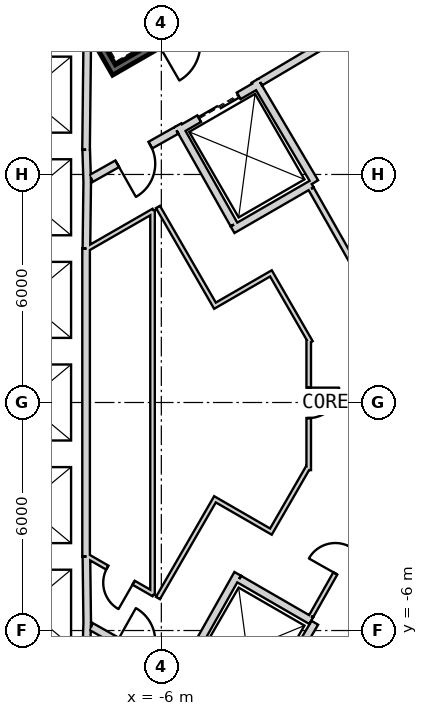
"""IFC4 building model, lengths in metres.
Left out: names, types, materials, properties, quantities, classifications, styles, units other than length and angle.
Written with IfcOpenShell. Run it as: python <this file> out.ifc"""

import sys

from ifc_helpers import new_model, si_unit, direction, frame, frame_2d, origin, place, context, subcontext, project, spatial, rectangle, extrude, element, fill, save


model = new_model("IFC4")
c1 = context("Model", 3, precision=1e-05, world=origin(), true_north=direction((0.0, 1.0)))
c2 = subcontext(c1, "Body", "Model", "MODEL_VIEW")
j1 = project(units=[si_unit("LENGTHUNIT", "METRE"), si_unit("PLANEANGLEUNIT", "RADIAN")], contexts=[c1])
p1 = place(None, origin())
s1 = spatial("IfcSite", under=j1, at=p1, CompositionType="ELEMENT")
p2 = place(p1, origin())
s2 = spatial("IfcBuilding", under=s1, at=p2, CompositionType="ELEMENT")
p3 = place(p2, frame((0.0, 0.0, 181.2)))
s3 = spatial("IfcBuildingStorey", under=s2, at=p3, CompositionType="ELEMENT", Elevation=181.2)
p4 = place(p3, frame((19.475, 2.208, 0.0), z_axis=(0.0, 0.0, 1.0), x_axis=(-0.866028369851, 0.499994862586, 0.0)))
e1 = element("IfcWall", 1, at=p4, inside=s3, PredefinedType="SHEAR", context=c2, shape_type="SweptSolid", body=[
    extrude(rectangle(XDim=31.523, YDim=0.9, at=frame_2d((15.762, 0.0))), origin(), (0.0, 0.0, 1.0), 4.0),
])
p5 = place(p4, frame((7.062, 0.0, 0.0)))
e2 = element("IfcOpeningElement", 2, at=p5, cuts=e1, PredefinedType="OPENING", context=c2, shape_type="SweptSolid", body=[
    extrude(rectangle(XDim=1.2, YDim=2.4, at=frame_2d((0.6, 1.2))), frame((0.0, 0.46, 0.0), z_axis=(0.0, -1.0, 0.0), x_axis=(1.0, 0.0, 0.0)), (0.0, 0.0, 1.0), 0.92),
])
p6 = place(p4, frame((3.612, 0.0, 0.0)))
e3 = element("IfcOpeningElement", 3, at=p6, cuts=e1, PredefinedType="OPENING", context=c2, shape_type="SweptSolid", body=[
    extrude(rectangle(XDim=1.2, YDim=2.4, at=frame_2d((0.6, 1.2))), frame((0.0, 0.46, 0.0), z_axis=(0.0, -1.0, 0.0), x_axis=(1.0, 0.0, 0.0)), (0.0, 0.0, 1.0), 0.92),
])
p7 = place(p4, frame((26.712, 0.0, 0.0)))
e4 = element("IfcOpeningElement", 4, at=p7, cuts=e1, PredefinedType="OPENING", context=c2, shape_type="SweptSolid", body=[
    extrude(rectangle(XDim=1.2, YDim=2.4, at=frame_2d((0.6, 1.2))), frame((0.0, 0.46, 0.0), z_axis=(0.0, -1.0, 0.0), x_axis=(1.0, 0.0, 0.0)), (0.0, 0.0, 1.0), 0.92),
])
p8 = place(p3, frame((-7.825, -17.97, 0.0), z_axis=(0.0, 0.0, 1.0), x_axis=(0.866028369851, 0.499994862586, 0.0)))
e5 = element("IfcWall", 5, at=p8, inside=s3, PredefinedType="SHEAR", context=c2, shape_type="SweptSolid", body=[
    extrude(rectangle(XDim=31.523, YDim=0.9, at=frame_2d((15.762, 0.0))), origin(), (0.0, 0.0, 1.0), 4.0),
])
p9 = place(p8, frame((7.062, 0.0, 0.0)))
e6 = element("IfcOpeningElement", 6, at=p9, cuts=e5, PredefinedType="OPENING", context=c2, shape_type="SweptSolid", body=[
    extrude(rectangle(XDim=1.2, YDim=2.4, at=frame_2d((0.6, 1.2))), frame((0.0, 0.46, 0.0), z_axis=(0.0, -1.0, 0.0), x_axis=(1.0, 0.0, 0.0)), (0.0, 0.0, 1.0), 0.92),
])
p10 = place(p8, frame((9.762, 0.0, 0.0)))
e7 = element("IfcOpeningElement", 7, at=p10, cuts=e5, PredefinedType="OPENING", context=c2, shape_type="SweptSolid", body=[
    extrude(rectangle(XDim=1.2, YDim=2.4, at=frame_2d((0.6, 1.2))), frame((0.0, 0.46, 0.0), z_axis=(0.0, -1.0, 0.0), x_axis=(1.0, 0.0, 0.0)), (0.0, 0.0, 1.0), 0.92),
])
p11 = place(p8, frame((12.462, 0.0, 0.0)))
e8 = element("IfcOpeningElement", 8, at=p11, cuts=e5, PredefinedType="OPENING", context=c2, shape_type="SweptSolid", body=[
    extrude(rectangle(XDim=1.2, YDim=2.4, at=frame_2d((0.6, 1.2))), frame((0.0, 0.46, 0.0), z_axis=(0.0, -1.0, 0.0), x_axis=(1.0, 0.0, 0.0)), (0.0, 0.0, 1.0), 0.92),
])
p12 = place(p8, frame((15.162, 0.0, 0.0)))
e9 = element("IfcOpeningElement", 9, at=p12, cuts=e5, PredefinedType="OPENING", context=c2, shape_type="SweptSolid", body=[
    extrude(rectangle(XDim=1.2, YDim=2.4, at=frame_2d((0.6, 1.2))), frame((0.0, 0.46, 0.0), z_axis=(0.0, -1.0, 0.0), x_axis=(1.0, 0.0, 0.0)), (0.0, 0.0, 1.0), 0.92),
])
p13 = place(p8, frame((17.862, 0.0, 0.0)))
e10 = element("IfcOpeningElement", 10, at=p13, cuts=e5, PredefinedType="OPENING", context=c2, shape_type="SweptSolid", body=[
    extrude(rectangle(XDim=1.2, YDim=2.4, at=frame_2d((0.6, 1.2))), frame((0.0, 0.46, 0.0), z_axis=(0.0, -1.0, 0.0), x_axis=(1.0, 0.0, 0.0)), (0.0, 0.0, 1.0), 0.92),
])
p14 = place(p8, frame((20.562, 0.0, 0.0)))
e11 = element("IfcOpeningElement", 11, at=p14, cuts=e5, PredefinedType="OPENING", context=c2, shape_type="SweptSolid", body=[
    extrude(rectangle(XDim=1.2, YDim=2.4, at=frame_2d((0.6, 1.2))), frame((0.0, 0.46, 0.0), z_axis=(0.0, -1.0, 0.0), x_axis=(1.0, 0.0, 0.0)), (0.0, 0.0, 1.0), 0.92),
])
p15 = place(p8, frame((26.712, 0.0, 0.0)))
e12 = element("IfcOpeningElement", 12, at=p15, cuts=e5, PredefinedType="OPENING", context=c2, shape_type="SweptSolid", body=[
    extrude(rectangle(XDim=1.2, YDim=2.4, at=frame_2d((0.6, 1.2))), frame((0.0, 0.46, 0.0), z_axis=(0.0, -1.0, 0.0), x_axis=(1.0, 0.0, 0.0)), (0.0, 0.0, 1.0), 0.92),
])
p16 = place(p8, frame((3.612, 0.0, 0.0)))
e13 = element("IfcOpeningElement", 13, at=p16, cuts=e5, PredefinedType="OPENING", context=c2, shape_type="SweptSolid", body=[
    extrude(rectangle(XDim=1.2, YDim=2.4, at=frame_2d((0.6, 1.2))), frame((0.0, 0.46, 0.0), z_axis=(0.0, -1.0, 0.0), x_axis=(1.0, 0.0, 0.0)), (0.0, 0.0, 1.0), 0.92),
])
p17 = place(p3, frame((-7.951, 9.35, 0.0), z_axis=(0.0, 0.0, 1.0), x_axis=(-0.011120469654, -0.999938165666, 0.0)))
e14 = element("IfcWall", 14, at=p17, inside=s3, PredefinedType="PLUMBINGWALL", context=c2, shape_type="SweptSolid", body=[
    extrude(rectangle(XDim=2.7, YDim=0.2, at=frame_2d((1.35, 0.0))), origin(), (0.0, 0.0, 1.0), 3.7),
])
p18 = place(p3, frame((-7.977, 6.65, 0.0), z_axis=(0.0, 0.0, 1.0), x_axis=(0.030861509705, -0.999523670164, 0.0)))
e15 = element("IfcWall", 15, at=p18, inside=s3, PredefinedType="PLUMBINGWALL", context=c2, shape_type="SweptSolid", body=[
    extrude(rectangle(XDim=0.878, YDim=0.2, at=frame_2d((0.439, 0.0))), origin(), (0.0, 0.0, 1.0), 3.7),
])
p19 = place(p3, frame((-7.949, 5.895, 0.0), z_axis=(0.0, 0.0, 1.0), x_axis=(-0.012042535896, -0.999927486035, 0.0)))
e16 = element("IfcWall", 16, at=p19, inside=s3, PredefinedType="PLUMBINGWALL", context=c2, shape_type="SweptSolid", body=[
    extrude(rectangle(XDim=1.845, YDim=0.2, at=frame_2d((0.922, 0.0))), origin(), (0.0, 0.0, 1.0), 3.7),
])
p20 = place(p3, frame((-7.98, 4.05, 0.0), z_axis=(0.0, 0.0, 1.0), x_axis=(0.0, -1.0, 0.0)))
e17 = element("IfcWall", 17, at=p20, inside=s3, PredefinedType="PLUMBINGWALL", context=c2, shape_type="SweptSolid", body=[
    extrude(rectangle(XDim=8.1, YDim=0.2, at=frame_2d((4.05, 0.0))), origin(), (0.0, 0.0, 1.0), 3.7),
])
p21 = place(p3, frame((-7.95, -5.772, 0.0), z_axis=(0.0, 0.0, 1.0), x_axis=(-0.030803413295, -0.999525462272, 0.0)))
e18 = element("IfcWall", 18, at=p21, inside=s3, PredefinedType="PLUMBINGWALL", context=c2, shape_type="SweptSolid", body=[
    extrude(rectangle(XDim=1.078, YDim=0.2, at=frame_2d((0.539, 0.0))), origin(), (0.0, 0.0, 1.0), 3.7),
])
p22 = place(p3, frame((-7.971, -4.05, 0.0), z_axis=(0.0, 0.0, 1.0), x_axis=(0.012042535896, -0.999927486035, 0.0)))
e19 = element("IfcWall", 19, at=p22, inside=s3, PredefinedType="PLUMBINGWALL", context=c2, shape_type="SweptSolid", body=[
    extrude(rectangle(XDim=1.845, YDim=0.2, at=frame_2d((0.922, 0.0))), origin(), (0.0, 0.0, 1.0), 3.7),
])
p23 = place(p3, frame((-11.245, 15.678, -0.3), z_axis=(0.0, 0.0, 1.0), x_axis=(0.499977274689, -0.866038523851, 0.0)))
e20 = element("IfcWall", 20, at=p23, inside=s3, PredefinedType="SHEAR", context=c2, shape_type="SweptSolid", body=[
    extrude(rectangle(XDim=8.1, YDim=0.2, at=frame_2d((4.05, 0.0))), origin(), (0.0, 0.0, 1.0), 4.0),
])
p24 = place(p3, frame((-7.159, 8.8, -0.3), z_axis=(0.0, 0.0, 1.0), x_axis=(0.866047807691, 0.499961193289, 0.0)))
e21 = element("IfcWall", 21, at=p24, inside=s3, PredefinedType="SHEAR", context=c2, shape_type="SweptSolid", body=[
    extrude(rectangle(XDim=3.6, YDim=0.2, at=frame_2d((1.8, 0.0))), origin(), (0.0, 0.0, 1.0), 4.0),
])
p25 = place(p24, frame((1.25, 0.0, 0.3)))
e22 = element("IfcOpeningElement", 22, at=p25, cuts=e21, PredefinedType="OPENING", context=c2, shape_type="SweptSolid", body=[
    extrude(rectangle(XDim=1.1, YDim=2.1, at=frame_2d((0.55, 1.05))), frame((0.0, 0.11, 0.0), z_axis=(0.0, -1.0, 0.0), x_axis=(1.0, 0.0, 0.0)), (0.0, 0.0, 1.0), 0.22),
])
p26 = place(p3, frame((-5.524, 7.168, 0.0), z_axis=(0.0, 0.0, 1.0), x_axis=(0.866024647952, 0.500001309137, 0.0)))
e23 = element("IfcWall", 23, at=p26, inside=s3, PredefinedType="PLUMBINGWALL", context=c2, shape_type="SweptSolid", body=[
    extrude(rectangle(XDim=2.4, YDim=0.2, at=frame_2d((1.2, 0.0))), origin(), (0.0, 0.0, 1.0), 3.7),
])
p27 = place(p26, frame((0.6, 0.0, 0.0)))
e24 = element("IfcOpeningElement", 24, at=p27, cuts=e23, PredefinedType="OPENING", context=c2, shape_type="SweptSolid", body=[
    extrude(rectangle(XDim=1.2, YDim=2.4, at=frame_2d((0.6, 1.2))), frame((0.0, 0.11, 0.0), z_axis=(0.0, -1.0, 0.0), x_axis=(1.0, 0.0, 0.0)), (0.0, 0.0, 1.0), 0.22),
])
p28 = place(p3, frame((-3.538, 8.465, 0.0), z_axis=(0.0, 0.0, 1.0), x_axis=(0.508647062354, -0.860975125052, 0.0)))
e25 = element("IfcWall", 25, at=p28, inside=s3, PredefinedType="PLUMBINGWALL", context=c2, shape_type="SweptSolid", body=[
    extrude(rectangle(XDim=3.1, YDim=0.2, at=frame_2d((1.55, 0.0))), origin(), (0.0, 0.0, 1.0), 3.7),
])
p29 = place(p3, frame((-2.043, 5.748, 0.0), z_axis=(0.0, 0.0, 1.0), x_axis=(-0.866035096217, -0.499983211839, 0.0)))
e26 = element("IfcWall", 26, at=p29, inside=s3, PredefinedType="PLUMBINGWALL", context=c2, shape_type="SweptSolid", body=[
    extrude(rectangle(XDim=2.404, YDim=0.2, at=frame_2d((1.202, 0.0))), origin(), (0.0, 0.0, 1.0), 3.7),
])
p30 = place(p3, frame((-5.562, 7.296, 0.0), z_axis=(0.0, 0.0, 1.0), x_axis=(0.49134651263, -0.870964180966, 0.0)))
e27 = element("IfcWall", 27, at=p30, inside=s3, PredefinedType="PLUMBINGWALL", context=c2, shape_type="SweptSolid", body=[
    extrude(rectangle(XDim=3.0, YDim=0.2, at=frame_2d((1.5, 0.0))), origin(), (0.0, 0.0, 1.0), 3.7),
])
p31 = place(p3, frame((-1.961, -5.796, 0.0), z_axis=(0.0, 0.0, 1.0), x_axis=(-0.508647062354, -0.860975125052, 0.0)))
e28 = element("IfcWall", 28, at=p31, inside=s3, PredefinedType="PLUMBINGWALL", context=c2, shape_type="SweptSolid", body=[
    extrude(rectangle(XDim=3.1, YDim=0.2, at=frame_2d((1.55, 0.0))), origin(), (0.0, 0.0, 1.0), 3.7),
])
p32 = place(p3, frame((-3.99, -4.509, 0.0), z_axis=(0.0, 0.0, 1.0), x_axis=(-0.491358283181, -0.870957540612, 0.0)))
e29 = element("IfcWall", 29, at=p32, inside=s3, PredefinedType="PLUMBINGWALL", context=c2, shape_type="SweptSolid", body=[
    extrude(rectangle(XDim=3.2, YDim=0.2, at=frame_2d((1.6, 0.0))), origin(), (0.0, 0.0, 1.0), 3.7),
])
p33 = place(p3, frame((-3.953, -4.646, 0.0), z_axis=(0.0, 0.0, 1.0), x_axis=(0.866038900241, -0.499976622722, 0.0)))
e30 = element("IfcWall", 30, at=p33, inside=s3, PredefinedType="PLUMBINGWALL", context=c2, shape_type="SweptSolid", body=[
    extrude(rectangle(XDim=2.189, YDim=0.2, at=frame_2d((1.095, 0.0))), origin(), (0.0, 0.0, 1.0), 3.7),
])
p34 = place(p3, frame((-1.055, 9.818, 0.0), z_axis=(0.0, 0.0, 1.0), x_axis=(-0.860614334655, -0.50925726994, 0.0)))
e31 = element("IfcWall", 31, at=p34, inside=s3, PredefinedType="PARTITIONING", context=c2, shape_type="SweptSolid", body=[
    extrude(rectangle(XDim=2.726, YDim=0.2, at=frame_2d((1.363, 0.0))), origin(), (0.0, 0.0, 1.0), 3.7),
])
p35 = place(p3, frame((-5.6, 7.16, 0.0), z_axis=(0.0, 0.0, 1.0), x_axis=(-0.871363259478, -0.490638431059, 0.0)))
e32 = element("IfcWall", 32, at=p35, inside=s3, PredefinedType="PARTITIONING", context=c2, shape_type="SweptSolid", body=[
    extrude(rectangle(XDim=2.581, YDim=0.2, at=frame_2d((1.291, 0.0))), origin(), (0.0, 0.0, 1.0), 3.7),
])
p36 = place(p35, frame((0.791, 0.0, 0.0)))
e33 = element("IfcOpeningElement", 33, at=p36, cuts=e32, PredefinedType="OPENING", context=c2, shape_type="SweptSolid", body=[
    extrude(rectangle(XDim=1.0, YDim=2.1, at=frame_2d((0.5, 1.05))), frame((0.0, 0.11, 0.0), z_axis=(0.0, -1.0, 0.0), x_axis=(1.0, 0.0, 0.0)), (0.0, 0.0, 1.0), 0.22),
])
p37 = place(p3, frame((-7.849, -5.894, 0.0), z_axis=(0.0, 0.0, 1.0), x_axis=(0.871363259478, -0.490638431059, 0.0)))
e34 = element("IfcWall", 34, at=p37, inside=s3, PredefinedType="PARTITIONING", context=c2, shape_type="SweptSolid", body=[
    extrude(rectangle(XDim=2.581, YDim=0.2, at=frame_2d((1.291, 0.0))), origin(), (0.0, 0.0, 1.0), 3.7),
])
p38 = place(p37, frame((0.791, 0.0, 0.0)))
e35 = element("IfcOpeningElement", 35, at=p38, cuts=e34, PredefinedType="OPENING", context=c2, shape_type="SweptSolid", body=[
    extrude(rectangle(XDim=1.0, YDim=2.1, at=frame_2d((0.5, 1.05))), frame((0.0, 0.11, 0.0), z_axis=(0.0, -1.0, 0.0), x_axis=(1.0, 0.0, 0.0)), (0.0, 0.0, 1.0), 0.22),
])
p39 = place(p3, frame((-2.059, 5.624, 0.0), z_axis=(0.0, 0.0, 1.0), x_axis=(0.49265005812, -0.870227510617, 0.0)))
e36 = element("IfcWall", 36, at=p39, inside=s3, PredefinedType="PLUMBINGWALL", context=c2, shape_type="SweptSolid", body=[
    extrude(rectangle(XDim=3.365, YDim=0.15, at=frame_2d((1.683, 0.0))), origin(), (0.0, 0.0, 1.0), 3.7),
])
p40 = place(p3, frame((-0.34, -2.586, 0.0), z_axis=(0.0, 0.0, 1.0), x_axis=(-0.492647196214, -0.870229130782, 0.0)))
e37 = element("IfcWall", 37, at=p40, inside=s3, PredefinedType="PARTITIONING", context=c2, shape_type="SweptSolid", body=[
    extrude(rectangle(XDim=3.49, YDim=0.12, at=frame_2d((1.745, 0.0))), origin(), (0.0, 0.0, 1.0), 3.7),
])
p41 = place(p40, frame((1.396, 0.0, 0.0)))
e38 = element("IfcOpeningElement", 38, at=p41, cuts=e37, PredefinedType="OPENING", context=c2, shape_type="SweptSolid", body=[
    extrude(rectangle(XDim=0.8, YDim=2.1, at=frame_2d((0.4, 1.05))), frame((0.0, 0.07, 0.0), z_axis=(0.0, -1.0, 0.0), x_axis=(1.0, 0.0, 0.0)), (0.0, 0.0, 1.0), 0.14),
])
p42 = place(p3, frame((-6.231, 5.062, 0.0), z_axis=(0.0, 0.0, 1.0), x_axis=(0.0, -1.0, 0.0)))
e39 = element("IfcWall", 39, at=p42, inside=s3, PredefinedType="PARTITIONING", context=c2, shape_type="SweptSolid", body=[
    extrude(rectangle(XDim=10.125, YDim=0.12, at=frame_2d((5.062, 0.0))), origin(), (0.0, 0.0, 1.0), 3.7),
])
p43 = place(p3, frame((-7.95, -4.041, 0.0), z_axis=(0.0, 0.0, 1.0), x_axis=(0.867071050325, -0.498184497639, 0.0)))
e40 = element("IfcWall", 40, at=p43, inside=s3, PredefinedType="PARTITIONING", context=c2, shape_type="SweptSolid", body=[
    extrude(rectangle(XDim=2.017, YDim=0.12, at=frame_2d((1.008, 0.0))), origin(), (0.0, 0.0, 1.0), 3.7),
])
p44 = place(p43, frame((0.608, 0.0, 0.0)))
e41 = element("IfcOpeningElement", 41, at=p44, cuts=e40, PredefinedType="OPENING", context=c2, shape_type="SweptSolid", body=[
    extrude(rectangle(XDim=0.8, YDim=2.1, at=frame_2d((0.4, 1.05))), frame((0.0, 0.07, 0.0), z_axis=(0.0, -1.0, 0.0), x_axis=(1.0, 0.0, 0.0)), (0.0, 0.0, 1.0), 0.14),
])
p45 = place(p3, frame((-6.201, 5.046, 0.0), z_axis=(0.0, 0.0, 1.0), x_axis=(-0.867071050325, -0.498184497639, 0.0)))
e42 = element("IfcWall", 42, at=p45, inside=s3, PredefinedType="PARTITIONING", context=c2, shape_type="SweptSolid", body=[
    extrude(rectangle(XDim=2.017, YDim=0.12, at=frame_2d((1.008, 0.0))), origin(), (0.0, 0.0, 1.0), 3.7),
])
p46 = place(p3, frame((-4.558, 2.495, 0.0), z_axis=(0.0, 0.0, 1.0), x_axis=(-0.499991792115, 0.866030142557, 0.0)))
e43 = element("IfcWall", 43, at=p46, inside=s3, PredefinedType="PARTITIONING", context=c2, shape_type="SweptSolid", body=[
    extrude(rectangle(XDim=3.06, YDim=0.12, at=frame_2d((1.53, 0.0))), origin(), (0.0, 0.0, 1.0), 3.7),
])
p47 = place(p3, frame((-3.064, 3.427, 0.0), z_axis=(0.0, 0.0, 1.0), x_axis=(-0.866087547558, -0.499892348375, 0.0)))
e44 = element("IfcWall", 44, at=p47, inside=s3, PredefinedType="PARTITIONING", context=c2, shape_type="SweptSolid", body=[
    extrude(rectangle(XDim=1.7, YDim=0.12, at=frame_2d((0.85, 0.0))), origin(), (0.0, 0.0, 1.0), 3.7),
])
p48 = place(p3, frame((-2.07, 1.585, 0.0), z_axis=(0.0, 0.0, 1.0), x_axis=(-0.499937346687, 0.86606157367, 0.0)))
e45 = element("IfcWall", 45, at=p48, inside=s3, PredefinedType="PARTITIONING", context=c2, shape_type="SweptSolid", body=[
    extrude(rectangle(XDim=2.032, YDim=0.12, at=frame_2d((1.016, 0.0))), origin(), (0.0, 0.0, 1.0), 3.7),
])
p49 = place(p3, frame((-2.122, -1.779, 0.0), z_axis=(0.0, 0.0, 1.0), x_axis=(0.0, 1.0, 0.0)))
e46 = element("IfcWall", 46, at=p49, inside=s3, PredefinedType="PARTITIONING", context=c2, shape_type="SweptSolid", body=[
    extrude(rectangle(XDim=3.435, YDim=0.12, at=frame_2d((1.718, 0.0))), origin(), (0.0, 0.0, 1.0), 3.7),
])
p50 = place(p49, frame((1.37, 0.0, 0.0)))
e47 = element("IfcOpeningElement", 47, at=p50, cuts=e46, PredefinedType="OPENING", context=c2, shape_type="SweptSolid", body=[
    extrude(rectangle(XDim=0.8, YDim=2.1, at=frame_2d((0.4, 1.05))), frame((0.0, 0.07, 0.0), z_axis=(0.0, -1.0, 0.0), x_axis=(1.0, 0.0, 0.0)), (0.0, 0.0, 1.0), 0.14),
])
p51 = place(p3, frame((-3.146, -3.449, 0.0), z_axis=(0.0, 0.0, 1.0), x_axis=(0.500007041985, 0.866021338054, 0.0)))
e48 = element("IfcWall", 48, at=p51, inside=s3, PredefinedType="PARTITIONING", context=c2, shape_type="SweptSolid", body=[
    extrude(rectangle(XDim=2.03, YDim=0.12, at=frame_2d((1.015, 0.0))), origin(), (0.0, 0.0, 1.0), 3.7),
])
p52 = place(p3, frame((-4.64, -2.517, 0.0), z_axis=(0.0, 0.0, 1.0), x_axis=(0.865989465428, -0.500062241894, 0.0)))
e49 = element("IfcWall", 49, at=p52, inside=s3, PredefinedType="PARTITIONING", context=c2, shape_type="SweptSolid", body=[
    extrude(rectangle(XDim=1.7, YDim=0.12, at=frame_2d((0.85, 0.0))), origin(), (0.0, 0.0, 1.0), 3.7),
])
p53 = place(p3, frame((-6.088, -5.145, 0.0), z_axis=(0.0, 0.0, 1.0), x_axis=(0.500050696077, 0.865996132412, 0.0)))
e50 = element("IfcWall", 50, at=p53, inside=s3, PredefinedType="PARTITIONING", context=c2, shape_type="SweptSolid", body=[
    extrude(rectangle(XDim=2.94, YDim=0.12, at=frame_2d((1.47, 0.0))), origin(), (0.0, 0.0, 1.0), 3.7),
])
p54 = place(p36, origin())
e51 = element("IfcDoor", 51, at=p54, inside=s3, OperationType="SINGLE_SWING_LEFT", PredefinedType="USERDEFINED", context=c2, shape_type="SweptSolid", body=[
    extrude(rectangle(XDim=1.0, YDim=2.1, at=frame_2d((0.5, 1.05))), frame((0.0, 0.025, 0.0), z_axis=(0.0, -1.0, 0.0), x_axis=(1.0, 0.0, 0.0)), (0.0, 0.0, 1.0), 0.05),
])
fill(e33, e51)
p55 = place(p27, origin())
e52 = element("IfcDoor", 52, at=p55, inside=s3, OperationType="SLIDING_TO_LEFT", PredefinedType="USERDEFINED", context=c2, shape_type="SweptSolid", body=[
    extrude(rectangle(XDim=1.2, YDim=2.4, at=frame_2d((0.6, 1.2))), frame((0.0, 0.025, 0.0), z_axis=(0.0, -1.0, 0.0), x_axis=(1.0, 0.0, 0.0)), (0.0, 0.0, 1.0), 0.05),
])
fill(e24, e52)
p56 = place(p41, origin())
e53 = element("IfcDoor", 53, at=p56, inside=s3, OperationType="SINGLE_SWING_RIGHT", PredefinedType="USERDEFINED", context=c2, shape_type="SweptSolid", body=[
    extrude(rectangle(XDim=0.8, YDim=2.1, at=frame_2d((0.4, 1.05))), frame((0.0, 0.025, 0.0), z_axis=(0.0, -1.0, 0.0), x_axis=(1.0, 0.0, 0.0)), (0.0, 0.0, 1.0), 0.05),
])
fill(e38, e53)
p57 = place(p44, origin())
e54 = element("IfcDoor", 54, at=p57, inside=s3, OperationType="SINGLE_SWING_RIGHT", PredefinedType="USERDEFINED", context=c2, shape_type="SweptSolid", body=[
    extrude(rectangle(XDim=0.8, YDim=2.1, at=frame_2d((0.4, 1.05))), frame((0.0, 0.025, 0.0), z_axis=(0.0, -1.0, 0.0), x_axis=(1.0, 0.0, 0.0)), (0.0, 0.0, 1.0), 0.05),
])
fill(e41, e54)
p58 = place(p50, origin())
e55 = element("IfcDoor", 55, at=p58, inside=s3, OperationType="SINGLE_SWING_RIGHT", PredefinedType="USERDEFINED", context=c2, shape_type="SweptSolid", body=[
    extrude(rectangle(XDim=0.8, YDim=2.1, at=frame_2d((0.4, 1.05))), frame((0.0, 0.025, 0.0), z_axis=(0.0, -1.0, 0.0), x_axis=(1.0, 0.0, 0.0)), (0.0, 0.0, 1.0), 0.05),
])
fill(e47, e55)
save(model, sys.argv[1])
